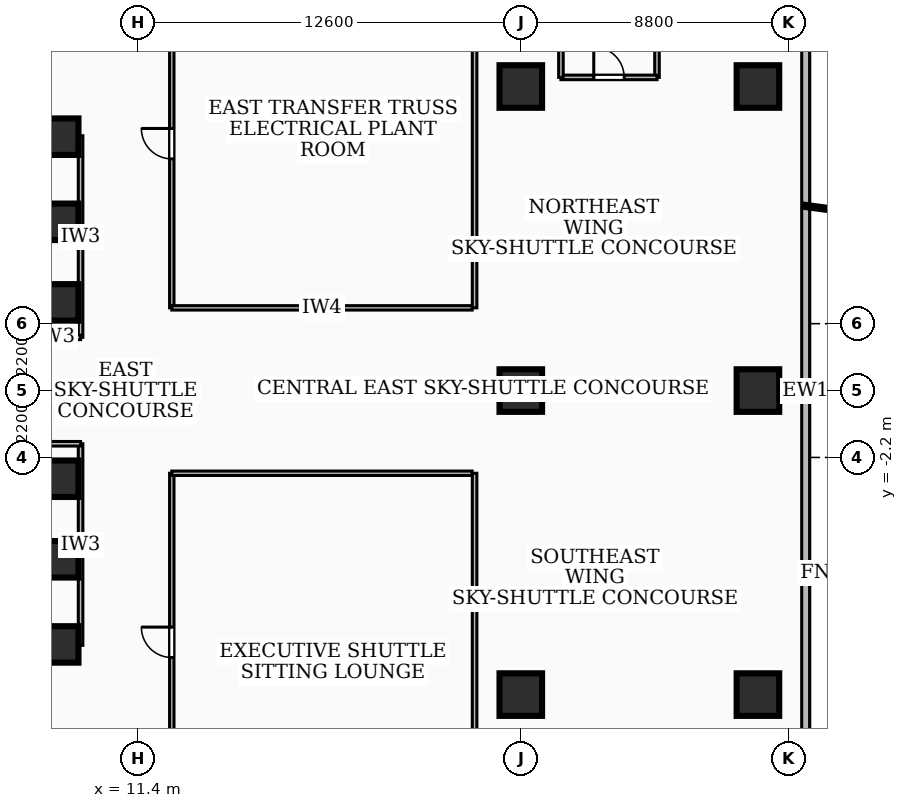
"""IFC4 building model, lengths in metres.
Left out: names, types, materials, properties, quantities, classifications, styles, units other than length and angle.
Written with IfcOpenShell. Run it as: python <this file> out.ifc"""

import sys

from ifc_helpers import new_model, si_unit, direction, frame, frame_2d, origin, origin_2d, place, context, subcontext, project, spatial, rectangle, extrude, element, fill, save


model = new_model("IFC4")
c1 = context("Model", 3, precision=1e-05, world=origin(), true_north=direction((0.0, 1.0)))
c2 = subcontext(c1, "Body", "Model", "MODEL_VIEW")
j1 = project(units=[si_unit("LENGTHUNIT", "METRE"), si_unit("PLANEANGLEUNIT", "RADIAN")], contexts=[c1])
p1 = place(None, origin())
s1 = spatial("IfcSite", under=j1, at=p1, CompositionType="ELEMENT")
p2 = place(p1, origin())
s2 = spatial("IfcBuilding", under=s1, at=p2, CompositionType="ELEMENT")
p3 = place(p2, frame((0.0, 0.0, 19.44)))
s3 = spatial("IfcBuildingStorey", under=s2, at=p3, CompositionType="ELEMENT", Elevation=19.44)
for number, where, z_axis, x_axis in (
    (1, (-8.78, 8.585, 0.0), (0.0, 0.0, 1.0), (1.0, 0.0, 0.0)),
    (2, (8.78, -8.585, 0.0), (0.0, 0.0, 1.0), (-1.0, 0.0, 0.0)),
):
    element("IfcWall", number, at=place(p3, frame(where, z_axis=z_axis, x_axis=x_axis)), inside=s3, PredefinedType="SHEAR", context=c2, shape_type="SweptSolid", body=[
        extrude(rectangle(XDim=17.56, YDim=0.55, at=frame_2d((8.78, 0.0))), origin(), (0.0, 0.0, 1.0), 4.78),
    ])
for number, where, z_axis, x_axis in (
    (3, (8.85, -5.55, 0.0), (0.0, 0.0, 1.0), (1.0, 0.0, 0.0)),
    (4, (8.85, -2.9, 0.0), (0.0, 0.0, 1.0), (1.0, 0.0, 0.0)),
    (5, (8.85, 2.9, 0.0), (0.0, 0.0, 1.0), (1.0, 0.0, 0.0)),
    (6, (8.85, 5.55, 0.0), (0.0, 0.0, 1.0), (1.0, 0.0, 0.0)),
    (7, (8.85, -8.35, 0.0), (0.0, 0.0, 1.0), (1.0, 0.0, 0.0)),
    (8, (8.85, 8.35, 0.0), (0.0, 0.0, 1.0), (1.0, 0.0, 0.0)),
):
    element("IfcColumn", number, at=place(p3, frame(where, z_axis=z_axis, x_axis=x_axis)), inside=s3, PredefinedType="COLUMN", context=c2, shape_type="SweptSolid", body=[
        extrude(rectangle(XDim=1.2, YDim=1.2, at=origin_2d()), origin(), (0.0, 0.0, 1.0), 5.04),
    ])
for number, where, z_axis, x_axis in (
    (9, (31.8, -10.0, 0.0), (0.0, 0.0, 1.0), (1.0, 0.0, 0.0)),
    (10, (31.8, 0.0, 0.0), (0.0, 0.0, 1.0), (1.0, 0.0, 0.0)),
    (11, (31.8, 10.0, 0.0), (0.0, 0.0, 1.0), (1.0, 0.0, 0.0)),
    (12, (24.0, -10.0, 0.0), (0.0, 0.0, 1.0), (1.0, 0.0, 0.0)),
    (13, (24.0, 0.0, 0.0), (0.0, 0.0, 1.0), (1.0, 0.0, 0.0)),
    (14, (24.0, 10.0, 0.0), (0.0, 0.0, 1.0), (1.0, 0.0, 0.0)),
):
    element("IfcColumn", number, at=place(p3, frame(where, z_axis=z_axis, x_axis=x_axis)), inside=s3, PredefinedType="COLUMN", context=c2, shape_type="SweptSolid", body=[
        extrude(rectangle(XDim=1.4, YDim=1.4, at=origin_2d()), origin(), (0.0, 0.0, 1.0), 5.04),
    ])
p4 = place(p3, frame((33.37, 27.14, 0.0), z_axis=(0.0, 0.0, 1.0), x_axis=(0.0, -1.0, 0.0)))
e15 = element("IfcWall", 15, at=p4, inside=s3, PredefinedType="SOLIDWALL", context=c2, shape_type="SweptSolid", body=[
    extrude(rectangle(XDim=54.28, YDim=0.26, at=frame_2d((27.14, 0.0))), origin(), (0.0, 0.0, 1.0), 4.78),
])
for number, where, z_axis, x_axis in (
    (16, (25.32, 10.3, 0.0), (0.0, 0.0, 1.0), (0.0, 1.0, 0.0)),
    (17, (28.48, 10.3, 0.0), (0.0, 0.0, 1.0), (0.0, 1.0, 0.0)),
):
    element("IfcWall", number, at=place(p3, frame(where, z_axis=z_axis, x_axis=x_axis)), inside=s3, PredefinedType="PARTITIONING", context=c2, shape_type="SweptSolid", body=[
        extrude(rectangle(XDim=9.8, YDim=0.15, at=frame_2d((4.9, 0.0))), origin(), (0.0, 0.0, 1.0), 2.572),
    ])
p5 = place(p3, frame((25.32, 10.3, 0.0), z_axis=(0.0, 0.0, 1.0), x_axis=(1.0, 0.0, 0.0)))
e18 = element("IfcWall", 18, at=p5, inside=s3, PredefinedType="PARTITIONING", context=c2, shape_type="SweptSolid", body=[
    extrude(rectangle(XDim=3.16, YDim=0.15, at=frame_2d((1.58, 0.0))), origin(), (0.0, 0.0, 1.0), 2.572),
])
p6 = place(p5, frame((1.08, 0.0, 0.0)))
e19 = element("IfcOpeningElement", 19, at=p6, cuts=e18, PredefinedType="OPENING", context=c2, shape_type="SweptSolid", body=[
    extrude(rectangle(XDim=1.0, YDim=2.1, at=frame_2d((0.5, 1.05))), frame((0.0, 0.085, 0.0), z_axis=(0.0, -1.0, 0.0), x_axis=(1.0, 0.0, 0.0)), (0.0, 0.0, 1.0), 0.17),
])
p7 = place(p3, frame((9.52, 1.75, 0.0), z_axis=(0.0, 0.0, 1.0), x_axis=(0.0, 1.0, 0.0)))
e20 = element("IfcWall", 20, at=p7, inside=s3, PredefinedType="PARTITIONING", context=c2, shape_type="SweptSolid", body=[
    extrude(rectangle(XDim=6.63, YDim=0.15, at=frame_2d((3.315, 0.0))), origin(), (0.0, 0.0, 1.0), 2.572),
])
p8 = place(p3, frame((7.85, 1.75, 0.0), z_axis=(0.0, 0.0, 1.0), x_axis=(1.0, 0.0, 0.0)))
e21 = element("IfcWall", 21, at=p8, inside=s3, PredefinedType="PARTITIONING", context=c2, shape_type="SweptSolid", body=[
    extrude(rectangle(XDim=1.67, YDim=0.15, at=frame_2d((0.835, 0.0))), origin(), (0.0, 0.0, 1.0), 3.845),
])
p9 = place(p3, frame((9.52, -8.38, 0.0), z_axis=(0.0, 0.0, 1.0), x_axis=(0.0, 1.0, 0.0)))
e22 = element("IfcWall", 22, at=p9, inside=s3, PredefinedType="PARTITIONING", context=c2, shape_type="SweptSolid", body=[
    extrude(rectangle(XDim=6.63, YDim=0.15, at=frame_2d((3.315, 0.0))), origin(), (0.0, 0.0, 1.0), 2.572),
])
p10 = place(p3, frame((7.85, -1.75, 0.0), z_axis=(0.0, 0.0, 1.0), x_axis=(1.0, 0.0, 0.0)))
e23 = element("IfcWall", 23, at=p10, inside=s3, PredefinedType="PARTITIONING", context=c2, shape_type="SweptSolid", body=[
    extrude(rectangle(XDim=1.67, YDim=0.15, at=frame_2d((0.835, 0.0))), origin(), (0.0, 0.0, 1.0), 3.845),
])
p11 = place(p3, frame((12.52, 2.72, 0.0), z_axis=(0.0, 0.0, 1.0), x_axis=(0.0, 1.0, 0.0)))
e24 = element("IfcWall", 24, at=p11, inside=s3, PredefinedType="PARTITIONING", context=c2, shape_type="SweptSolid", body=[
    extrude(rectangle(XDim=10.96, YDim=0.145, at=frame_2d((5.48, 0.0))), origin(), (0.0, 0.0, 1.0), 2.572),
])
p12 = place(p11, frame((4.9, 0.0, 0.0)))
e25 = element("IfcOpeningElement", 25, at=p12, cuts=e24, PredefinedType="OPENING", context=c2, shape_type="SweptSolid", body=[
    extrude(rectangle(XDim=1.0, YDim=2.1, at=frame_2d((0.5, 1.05))), frame((0.0, 0.083, 0.0), z_axis=(0.0, -1.0, 0.0), x_axis=(1.0, 0.0, 0.0)), (0.0, 0.0, 1.0), 0.165),
])
p13 = place(p3, frame((12.52, 2.72, 0.0), z_axis=(0.0, 0.0, 1.0), x_axis=(1.0, 0.0, 0.0)))
e26 = element("IfcWall", 26, at=p13, inside=s3, PredefinedType="PARTITIONING", context=c2, shape_type="SweptSolid", body=[
    extrude(rectangle(XDim=9.88, YDim=0.145, at=frame_2d((4.94, 0.0))), origin(), (0.0, 0.0, 1.0), 2.572),
])
p14 = place(p3, frame((22.48, 2.72, 0.0), z_axis=(0.0, 0.0, 1.0), x_axis=(0.0, 1.0, 0.0)))
e27 = element("IfcWall", 27, at=p14, inside=s3, PredefinedType="PARTITIONING", context=c2, shape_type="SweptSolid", body=[
    extrude(rectangle(XDim=10.96, YDim=0.15, at=frame_2d((5.48, 0.0))), origin(), (0.0, 0.0, 1.0), 2.572),
])
p15 = place(p3, frame((12.52, -13.68, 0.0), z_axis=(0.0, 0.0, 1.0), x_axis=(0.0, 1.0, 0.0)))
e28 = element("IfcWall", 28, at=p15, inside=s3, PredefinedType="PARTITIONING", context=c2, shape_type="SweptSolid", body=[
    extrude(rectangle(XDim=10.96, YDim=0.145, at=frame_2d((5.48, 0.0))), origin(), (0.0, 0.0, 1.0), 2.572),
])
p16 = place(p15, frame((4.9, 0.0, 0.0)))
e29 = element("IfcOpeningElement", 29, at=p16, cuts=e28, PredefinedType="OPENING", context=c2, shape_type="SweptSolid", body=[
    extrude(rectangle(XDim=1.0, YDim=2.1, at=frame_2d((0.5, 1.05))), frame((0.0, 0.083, 0.0), z_axis=(0.0, -1.0, 0.0), x_axis=(1.0, 0.0, 0.0)), (0.0, 0.0, 1.0), 0.165),
])
p17 = place(p3, frame((12.52, -2.72, 0.0), z_axis=(0.0, 0.0, 1.0), x_axis=(1.0, 0.0, 0.0)))
e30 = element("IfcWall", 30, at=p17, inside=s3, PredefinedType="PARTITIONING", context=c2, shape_type="SweptSolid", body=[
    extrude(rectangle(XDim=9.88, YDim=0.145, at=frame_2d((4.94, 0.0))), origin(), (0.0, 0.0, 1.0), 2.572),
])
p18 = place(p3, frame((22.48, -13.68, 0.0), z_axis=(0.0, 0.0, 1.0), x_axis=(0.0, 1.0, 0.0)))
e31 = element("IfcWall", 31, at=p18, inside=s3, PredefinedType="PARTITIONING", context=c2, shape_type="SweptSolid", body=[
    extrude(rectangle(XDim=10.96, YDim=0.15, at=frame_2d((5.48, 0.0))), origin(), (0.0, 0.0, 1.0), 2.572),
])
p19 = place(p6, origin())
e32 = element("IfcDoor", 32, at=p19, inside=s3, OperationType="SINGLE_SWING_LEFT", PredefinedType="DOOR", context=c2, shape_type="SweptSolid", body=[
    extrude(rectangle(XDim=1.0, YDim=2.1, at=frame_2d((0.5, 1.05))), frame((0.0, 0.025, 0.0), z_axis=(0.0, -1.0, 0.0), x_axis=(1.0, 0.0, 0.0)), (0.0, 0.0, 1.0), 0.05),
])
fill(e19, e32)
p20 = place(p12, origin())
e33 = element("IfcDoor", 33, at=p20, inside=s3, OperationType="SINGLE_SWING_RIGHT", PredefinedType="DOOR", context=c2, shape_type="SweptSolid", body=[
    extrude(rectangle(XDim=1.0, YDim=2.1, at=frame_2d((0.5, 1.05))), frame((0.0, 0.025, 0.0), z_axis=(0.0, -1.0, 0.0), x_axis=(1.0, 0.0, 0.0)), (0.0, 0.0, 1.0), 0.05),
])
fill(e25, e33)
p21 = place(p16, origin())
e34 = element("IfcDoor", 34, at=p21, inside=s3, OperationType="SINGLE_SWING_RIGHT", PredefinedType="DOOR", context=c2, shape_type="SweptSolid", body=[
    extrude(rectangle(XDim=1.0, YDim=2.1, at=frame_2d((0.5, 1.05))), frame((0.0, 0.025, 0.0), z_axis=(0.0, -1.0, 0.0), x_axis=(1.0, 0.0, 0.0)), (0.0, 0.0, 1.0), 0.05),
])
fill(e29, e34)
save(model, sys.argv[1])
